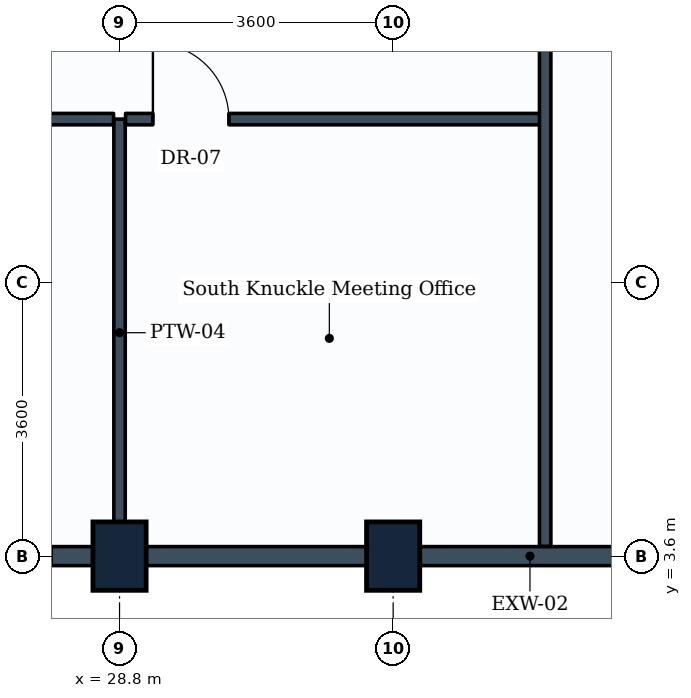
"""IFC4 building model, lengths in metres.
Left out: names, types, materials, properties, quantities, classifications, styles, units other than length and angle.
Written with IfcOpenShell. Run it as: python <this file> out.ifc"""

import sys

from ifc_helpers import new_model, si_unit, direction, frame, frame_2d, origin, origin_2d, place, context, subcontext, project, spatial, rectangle, extrude, element, fill, save


model = new_model("IFC4")
c1 = context("Model", 3, precision=1e-05, world=origin(), true_north=direction((0.0, 1.0)))
c2 = subcontext(c1, "Body", "Model", "MODEL_VIEW")
j1 = project(units=[si_unit("LENGTHUNIT", "METRE"), si_unit("PLANEANGLEUNIT", "RADIAN")], contexts=[c1])
p1 = place(None, origin())
s1 = spatial("IfcSite", under=j1, at=p1, CompositionType="ELEMENT")
p2 = place(p1, origin())
s2 = spatial("IfcBuilding", under=s1, at=p2, CompositionType="ELEMENT")
p3 = place(p2, frame((0.0, 0.0, 190.0)))
s3 = spatial("IfcBuildingStorey", under=s2, at=p3, CompositionType="ELEMENT", Elevation=190.0)
for number, where, z_axis, x_axis in (
    (1, (28.8, 3.6, 0.0), (0.0, 0.0, 1.0), (1.0, 0.0, 0.0)),
    (2, (32.4, 3.6, 0.0), (0.0, 0.0, 1.0), (1.0, 0.0, 0.0)),
):
    element("IfcColumn", number, at=place(p3, frame(where, z_axis=z_axis, x_axis=x_axis)), inside=s3, PredefinedType="COLUMN", context=c2, shape_type="SweptSolid", body=[
        extrude(rectangle(XDim=0.7, YDim=0.9, at=origin_2d()), origin(), (0.0, 0.0, 1.0), 3.8),
    ])
p4 = place(p3, frame((28.8, 3.6, 0.0), z_axis=(0.0, 0.0, 1.0), x_axis=(-1.0, 0.0, 0.0)))
e3 = element("IfcWall", 3, at=p4, inside=s3, PredefinedType="STANDARD", context=c2, shape_type="SweptSolid", body=[
    extrude(rectangle(XDim=3.6, YDim=0.25, at=frame_2d((1.8, 0.0))), origin(), (0.0, 0.0, 1.0), 2.93),
])
p5 = place(p4, frame((0.9, 0.0, 0.85)))
e4 = element("IfcOpeningElement", 4, at=p5, cuts=e3, PredefinedType="OPENING", context=c2, shape_type="SweptSolid", body=[
    extrude(rectangle(XDim=1.8, YDim=1.35, at=frame_2d((0.9, 0.675))), frame((0.0, 0.135, 0.0), z_axis=(0.0, -1.0, 0.0), x_axis=(1.0, 0.0, 0.0)), (0.0, 0.0, 1.0), 0.27),
])
p6 = place(p3, frame((32.4, 3.6, 0.0), z_axis=(0.0, 0.0, 1.0), x_axis=(-1.0, 0.0, 0.0)))
e5 = element("IfcWall", 5, at=p6, inside=s3, PredefinedType="STANDARD", context=c2, shape_type="SweptSolid", body=[
    extrude(rectangle(XDim=3.6, YDim=0.25, at=frame_2d((1.8, 0.0))), origin(), (0.0, 0.0, 1.0), 2.93),
])
p7 = place(p3, frame((36.0, 3.6, 0.0), z_axis=(0.0, 0.0, 1.0), x_axis=(-1.0, 0.0, 0.0)))
e6 = element("IfcWall", 6, at=p7, inside=s3, PredefinedType="STANDARD", context=c2, shape_type="SweptSolid", body=[
    extrude(rectangle(XDim=3.6, YDim=0.25, at=frame_2d((1.8, 0.0))), origin(), (0.0, 0.0, 1.0), 2.93),
])
p8 = place(p3, frame((28.8, 9.35, 0.0), z_axis=(0.0, 0.0, 1.0), x_axis=(0.0, -1.0, 0.0)))
e7 = element("IfcWall", 7, at=p8, inside=s3, PredefinedType="PARTITIONING", context=c2, shape_type="SweptSolid", body=[
    extrude(rectangle(XDim=5.621, YDim=0.15, at=frame_2d((2.811, 0.0))), origin(), (0.0, 0.0, 1.0), 3.535),
])
p9 = place(p3, frame((13.08, 9.35, 0.0), z_axis=(0.0, 0.0, 1.0), x_axis=(1.0, 0.0, 0.0)))
e8 = element("IfcWall", 8, at=p9, inside=s3, PredefinedType="PARTITIONING", context=c2, shape_type="SweptSolid", body=[
    extrude(rectangle(XDim=15.641, YDim=0.15, at=frame_2d((7.82, 0.0))), origin(), (0.0, 0.0, 1.0), 3.17),
])
p10 = place(p3, frame((28.879, 9.35, 0.0), z_axis=(0.0, 0.0, 1.0), x_axis=(1.0, 0.0, 0.0)))
e9 = element("IfcWall", 9, at=p10, inside=s3, PredefinedType="PARTITIONING", context=c2, shape_type="SweptSolid", body=[
    extrude(rectangle(XDim=5.521, YDim=0.15, at=frame_2d((2.76, 0.0))), origin(), (0.0, 0.0, 1.0), 3.535),
])
p11 = place(p10, frame((0.36, 0.0, 0.0)))
e10 = element("IfcOpeningElement", 10, at=p11, cuts=e9, PredefinedType="OPENING", context=c2, shape_type="SweptSolid", body=[
    extrude(rectangle(XDim=1.0, YDim=2.1, at=frame_2d((0.5, 1.05))), frame((0.0, 0.085, 0.0), z_axis=(0.0, -1.0, 0.0), x_axis=(1.0, 0.0, 0.0)), (0.0, 0.0, 1.0), 0.17),
])
p12 = place(p3, frame((34.4, 3.729, 0.0), z_axis=(0.0, 0.0, 1.0), x_axis=(0.0, 1.0, 0.0)))
e11 = element("IfcWall", 11, at=p12, inside=s3, PredefinedType="PARTITIONING", context=c2, shape_type="SweptSolid", body=[
    extrude(rectangle(XDim=14.121, YDim=0.15, at=frame_2d((7.061, 0.0))), origin(), (0.0, 0.0, 1.0), 2.93),
])
p13 = place(p11, origin())
e12 = element("IfcDoor", 12, at=p13, inside=s3, OperationType="SINGLE_SWING_LEFT", PredefinedType="DOOR", context=c2, shape_type="SweptSolid", body=[
    extrude(rectangle(XDim=1.0, YDim=2.1, at=frame_2d((0.5, 1.05))), frame((0.0, 0.025, 0.0), z_axis=(0.0, -1.0, 0.0), x_axis=(1.0, 0.0, 0.0)), (0.0, 0.0, 1.0), 0.05),
])
fill(e10, e12)
save(model, sys.argv[1])
